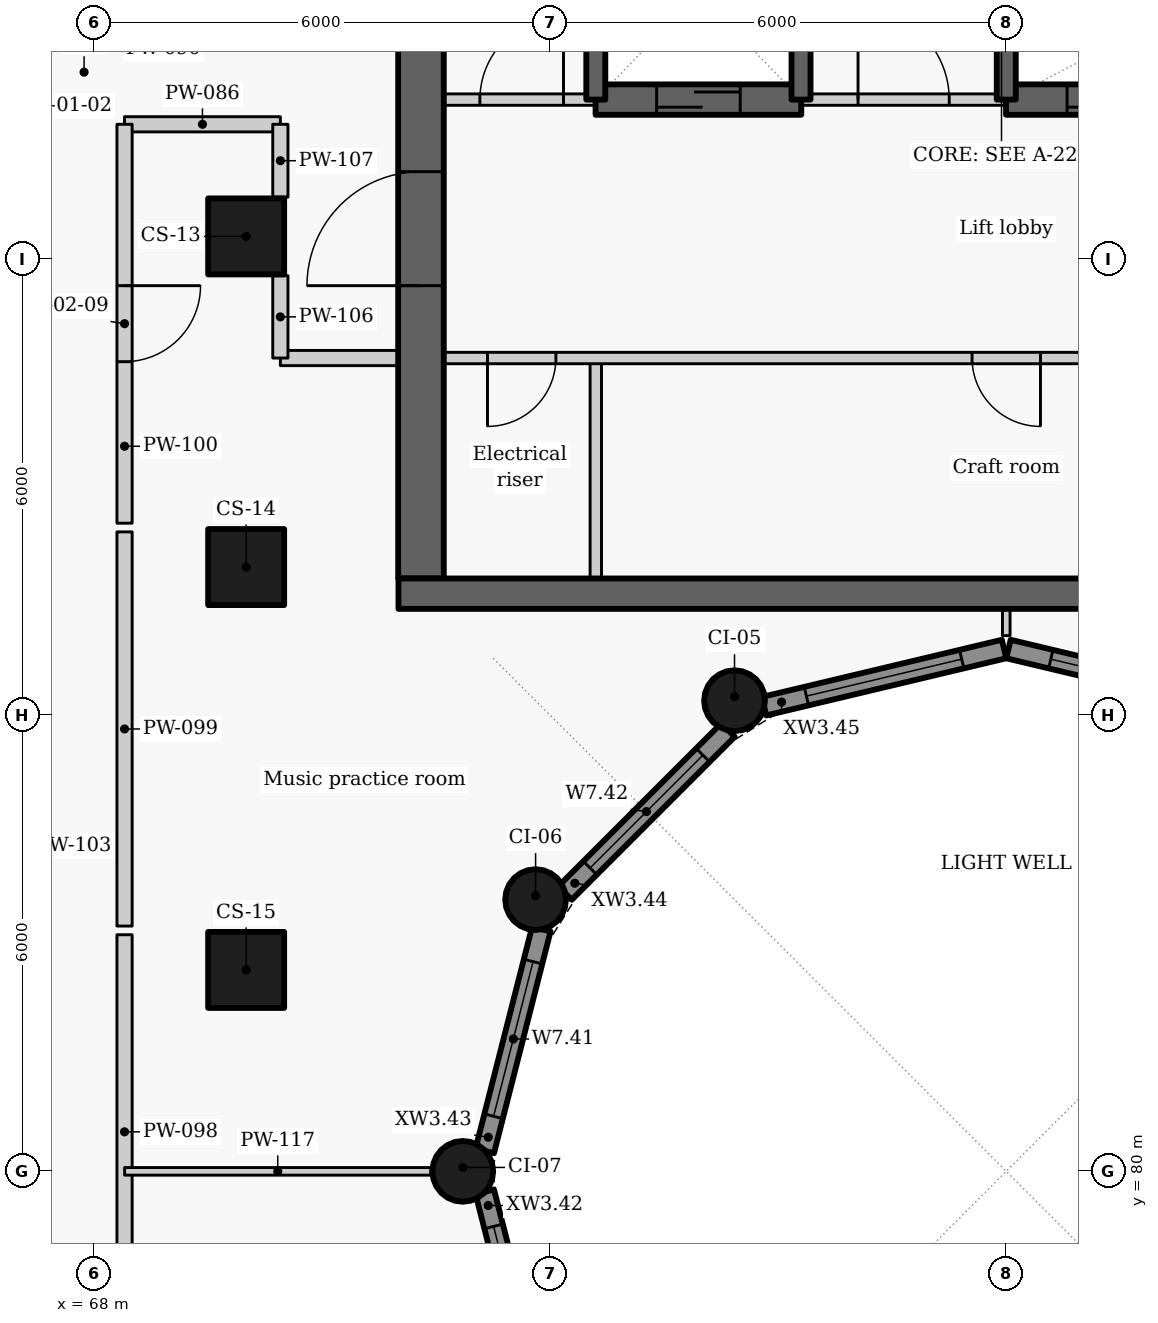
"""IFC4 building model, lengths in metres.
Left out: names, types, materials, properties, quantities, classifications, styles, units other than length and angle.
Written with IfcOpenShell. Run it as: python <this file> out.ifc"""

import sys

from ifc_helpers import new_model, si_unit, direction, frame, frame_2d, origin, origin_2d, place, context, subcontext, project, spatial, rectangle, circle, extrude, element, fill, save


model = new_model("IFC4")
c1 = context("Model", 3, precision=1e-05, world=origin(), true_north=direction((0.0, 1.0)))
c2 = subcontext(c1, "Body", "Model", "MODEL_VIEW")
j1 = project(units=[si_unit("LENGTHUNIT", "METRE"), si_unit("PLANEANGLEUNIT", "RADIAN")], contexts=[c1])
p1 = place(None, origin())
s1 = spatial("IfcSite", under=j1, at=p1, CompositionType="ELEMENT")
p2 = place(p1, origin())
s2 = spatial("IfcBuilding", under=s1, at=p2, CompositionType="ELEMENT")
p3 = place(p2, frame((0.0, 0.0, 130.5)))
s3 = spatial("IfcBuildingStorey", under=s2, at=p3, CompositionType="ELEMENT", Elevation=130.5)
for number, where, z_axis, x_axis in (
    (1, (70.0, 92.3, 0.0), (0.0, 0.0, 1.0), (0.0, -1.0, 0.0)),
    (2, (70.0, 87.95, 0.0), (0.0, 0.0, 1.0), (0.0, -1.0, 0.0)),
    (3, (70.0, 82.65, 0.0), (0.0, 0.0, 1.0), (0.0, -1.0, 0.0)),
):
    element("IfcColumn", number, at=place(p3, frame(where, z_axis=z_axis, x_axis=x_axis)), inside=s3, PredefinedType="COLUMN", context=c2, shape_type="SweptSolid", body=[
        extrude(rectangle(XDim=1.0, YDim=1.0, at=origin_2d()), origin(), (0.0, 0.0, 1.0), 3.3),
    ])
for number, where, z_axis, x_axis in (
    (4, (76.425, 86.192, 0.0), (0.0, 0.0, 1.0), (-0.866, -0.5, 0.0)),
    (5, (73.808, 83.575, 0.0), (0.0, 0.0, 1.0), (-0.5, -0.866, 0.0)),
    (6, (72.85, 80.0, 0.0), (0.0, 0.0, 1.0), (0.0, -1.0, 0.0)),
):
    element("IfcColumn", number, at=place(p3, frame(where, z_axis=z_axis, x_axis=x_axis)), inside=s3, PredefinedType="COLUMN", context=c2, shape_type="SweptSolid", body=[
        extrude(circle(Radius=0.4, at=origin_2d()), origin(), (0.0, 0.0, 1.0), 3.3),
    ])
p4 = place(p3, frame((73.883, 76.813, 0.0), z_axis=(0.0, 0.0, 1.0), x_axis=(-0.247055971283, 0.969001211069, 0.0)))
e7 = element("IfcWall", 7, at=p4, inside=s3, PredefinedType="SOLIDWALL", context=c2, shape_type="SweptSolid", body=[
    extrude(rectangle(XDim=3.01, YDim=0.25, at=frame_2d((1.505, 0.0))), origin(), (0.0, 0.0, 1.0), 2.425),
])
p5 = place(p4, frame((0.441, 0.0, 0.9)))
e8 = element("IfcOpeningElement", 8, at=p5, cuts=e7, PredefinedType="OPENING", context=c2, shape_type="SweptSolid", body=[
    extrude(rectangle(XDim=2.1, YDim=1.1, at=frame_2d((1.05, 0.55))), frame((0.0, 0.135, 0.0), z_axis=(0.0, -1.0, 0.0), x_axis=(1.0, 0.0, 0.0)), (0.0, 0.0, 1.0), 0.27),
])
p6 = place(p3, frame((73.14, 80.27, 0.0), z_axis=(0.0, 0.0, 1.0), x_axis=(0.247055971283, 0.969001211069, 0.0)))
e9 = element("IfcWall", 9, at=p6, inside=s3, PredefinedType="SOLIDWALL", context=c2, shape_type="SweptSolid", body=[
    extrude(rectangle(XDim=3.01, YDim=0.25, at=frame_2d((1.505, 0.0))), origin(), (0.0, 0.0, 1.0), 2.425),
])
p7 = place(p6, frame((0.469, 0.0, 0.9)))
e10 = element("IfcOpeningElement", 10, at=p7, cuts=e9, PredefinedType="OPENING", context=c2, shape_type="SweptSolid", body=[
    extrude(rectangle(XDim=2.1, YDim=1.1, at=frame_2d((1.05, 0.55))), frame((0.0, 0.135, 0.0), z_axis=(0.0, -1.0, 0.0), x_axis=(1.0, 0.0, 0.0)), (0.0, 0.0, 1.0), 0.27),
])
p8 = place(p3, frame((74.194, 83.661, 0.0), z_axis=(0.0, 0.0, 1.0), x_axis=(0.707106781187, 0.707106781187, 0.0)))
e11 = element("IfcWall", 11, at=p8, inside=s3, PredefinedType="SOLIDWALL", context=c2, shape_type="SweptSolid", body=[
    extrude(rectangle(XDim=3.033, YDim=0.25, at=frame_2d((1.517, 0.0))), origin(), (0.0, 0.0, 1.0), 2.425),
])
p9 = place(p8, frame((0.467, 0.0, 0.9)))
e12 = element("IfcOpeningElement", 12, at=p9, cuts=e11, PredefinedType="OPENING", context=c2, shape_type="SweptSolid", body=[
    extrude(rectangle(XDim=2.1, YDim=1.1, at=frame_2d((1.05, 0.55))), frame((0.0, 0.135, 0.0), z_axis=(0.0, -1.0, 0.0), x_axis=(1.0, 0.0, 0.0)), (0.0, 0.0, 1.0), 0.27),
])
p10 = place(p3, frame((76.814, 86.119, 0.0), z_axis=(0.0, 0.0, 1.0), x_axis=(0.972773113459, 0.231759508395, 0.0)))
e13 = element("IfcWall", 13, at=p10, inside=s3, PredefinedType="SOLIDWALL", context=c2, shape_type="SweptSolid", body=[
    extrude(rectangle(XDim=3.246, YDim=0.25, at=frame_2d((1.623, 0.0))), origin(), (0.0, 0.0, 1.0), 2.425),
])
p11 = place(p10, frame((0.573, 0.0, 0.9)))
e14 = element("IfcOpeningElement", 14, at=p11, cuts=e13, PredefinedType="OPENING", context=c2, shape_type="SweptSolid", body=[
    extrude(rectangle(XDim=2.1, YDim=1.1, at=frame_2d((1.05, 0.55))), frame((0.0, 0.135, 0.0), z_axis=(0.0, -1.0, 0.0), x_axis=(1.0, 0.0, 0.0)), (0.0, 0.0, 1.0), 0.27),
])
p12 = place(p3, frame((80.029, 86.872, 0.0), z_axis=(0.0, 0.0, 1.0), x_axis=(0.972773113459, -0.231759508395, 0.0)))
e15 = element("IfcWall", 15, at=p12, inside=s3, PredefinedType="SOLIDWALL", context=c2, shape_type="SweptSolid", body=[
    extrude(rectangle(XDim=3.246, YDim=0.25, at=frame_2d((1.623, 0.0))), origin(), (0.0, 0.0, 1.0), 2.425),
])
p13 = place(p12, frame((0.573, 0.0, 0.9)))
e16 = element("IfcOpeningElement", 16, at=p13, cuts=e15, PredefinedType="OPENING", context=c2, shape_type="SweptSolid", body=[
    extrude(rectangle(XDim=2.1, YDim=1.1, at=frame_2d((1.05, 0.55))), frame((0.0, 0.135, 0.0), z_axis=(0.0, -1.0, 0.0), x_axis=(1.0, 0.0, 0.0)), (0.0, 0.0, 1.0), 0.27),
])
p14 = place(p3, frame((74.6, 87.8, 0.0), z_axis=(0.0, 0.0, 1.0), x_axis=(0.0, 1.0, 0.0)))
e17 = element("IfcWall", 17, at=p14, inside=s3, PredefinedType="PARTITIONING", context=c2, shape_type="SweptSolid", body=[
    extrude(rectangle(XDim=2.9, YDim=0.15, at=frame_2d((1.45, 0.0))), origin(), (0.0, 0.0, 1.0), 3.025),
])
p15 = place(p3, frame((85.4, 90.7, 0.0), z_axis=(0.0, 0.0, 1.0), x_axis=(-1.0, 0.0, 0.0)))
e18 = element("IfcWall", 18, at=p15, inside=s3, PredefinedType="PARTITIONING", context=c2, shape_type="SweptSolid", body=[
    extrude(rectangle(XDim=13.4, YDim=0.15, at=frame_2d((6.7, 0.0))), origin(), (0.0, 0.0, 1.0), 3.025),
])
p16 = place(p15, frame((11.325, 0.0, 0.0)))
e19 = element("IfcOpeningElement", 19, at=p16, cuts=e18, PredefinedType="OPENING", context=c2, shape_type="SweptSolid", body=[
    extrude(rectangle(XDim=0.9, YDim=2.1, at=frame_2d((0.45, 1.05))), frame((0.0, 0.085, 0.0), z_axis=(0.0, -1.0, 0.0), x_axis=(1.0, 0.0, 0.0)), (0.0, 0.0, 1.0), 0.17),
])
p17 = place(p15, frame((4.95, 0.0, 0.0)))
e20 = element("IfcOpeningElement", 20, at=p17, cuts=e18, PredefinedType="OPENING", context=c2, shape_type="SweptSolid", body=[
    extrude(rectangle(XDim=0.9, YDim=2.1, at=frame_2d((0.45, 1.05))), frame((0.0, 0.085, 0.0), z_axis=(0.0, -1.0, 0.0), x_axis=(1.0, 0.0, 0.0)), (0.0, 0.0, 1.0), 0.17),
])
p18 = place(p3, frame((72.3, 87.8, -0.275), z_axis=(0.0, 0.0, 1.0), x_axis=(0.0, 1.0, 0.0)))
e21 = element("IfcWall", 21, at=p18, inside=s3, PredefinedType="SHEAR", context=c2, shape_type="SweptSolid", body=[
    extrude(rectangle(XDim=9.1, YDim=0.6, at=frame_2d((4.55, 0.0))), origin(), (0.0, 0.0, 1.0), 3.3),
])
p19 = place(p18, frame((3.852, 0.0, 0.275)))
e22 = element("IfcOpeningElement", 22, at=p19, cuts=e21, PredefinedType="OPENING", context=c2, shape_type="SweptSolid", body=[
    extrude(rectangle(XDim=1.5, YDim=2.1, at=frame_2d((0.75, 1.05))), frame((0.0, 0.31, 0.0), z_axis=(0.0, -1.0, 0.0), x_axis=(1.0, 0.0, 0.0)), (0.0, 0.0, 1.0), 0.62),
])
p20 = place(p3, frame((72.0, 94.1, 0.0), z_axis=(0.0, 0.0, 1.0), x_axis=(1.0, 0.0, 0.0)))
e23 = element("IfcWall", 23, at=p20, inside=s3, PredefinedType="PARTITIONING", context=c2, shape_type="SweptSolid", body=[
    extrude(rectangle(XDim=2.603, YDim=0.15, at=frame_2d((1.302, 0.0))), origin(), (0.0, 0.0, 1.0), 3.025),
])
p21 = place(p20, frame((1.075, 0.0, 0.0)))
e24 = element("IfcOpeningElement", 24, at=p21, cuts=e23, PredefinedType="OPENING", context=c2, shape_type="SweptSolid", body=[
    extrude(rectangle(XDim=1.1, YDim=2.1, at=frame_2d((0.55, 1.05))), frame((0.0, 0.085, 0.0), z_axis=(0.0, -1.0, 0.0), x_axis=(1.0, 0.0, 0.0)), (0.0, 0.0, 1.0), 0.17),
])
p22 = place(p3, frame((77.297, 94.1, 0.0), z_axis=(0.0, 0.0, 1.0), x_axis=(1.0, 0.0, 0.0)))
e25 = element("IfcWall", 25, at=p22, inside=s3, PredefinedType="PARTITIONING", context=c2, shape_type="SweptSolid", body=[
    extrude(rectangle(XDim=2.706, YDim=0.15, at=frame_2d((1.353, 0.0))), origin(), (0.0, 0.0, 1.0), 3.025),
])
p23 = place(p22, frame((0.753, 0.0, 0.0)))
e26 = element("IfcOpeningElement", 26, at=p23, cuts=e25, PredefinedType="OPENING", context=c2, shape_type="SweptSolid", body=[
    extrude(rectangle(XDim=1.2, YDim=2.1, at=frame_2d((0.6, 1.05))), frame((0.0, 0.085, 0.0), z_axis=(0.0, -1.0, 0.0), x_axis=(1.0, 0.0, 0.0)), (0.0, 0.0, 1.0), 0.17),
])
p24 = place(p3, frame((74.597, 94.1, -0.275), z_axis=(0.0, 0.0, 1.0), x_axis=(1.0, 0.0, 0.0)))
e27 = element("IfcWall", 27, at=p24, inside=s3, PredefinedType="SHEAR", context=c2, shape_type="SweptSolid", body=[
    extrude(rectangle(XDim=2.706, YDim=0.4, at=frame_2d((1.353, 0.0))), origin(), (0.0, 0.0, 1.0), 3.3),
])
p25 = place(p24, frame((0.803, 0.0, 0.275)))
e28 = element("IfcOpeningElement", 28, at=p25, cuts=e27, PredefinedType="OPENING", context=c2, shape_type="SweptSolid", body=[
    extrude(rectangle(XDim=1.1, YDim=2.1, at=frame_2d((0.55, 1.05))), frame((0.0, 0.21, 0.0), z_axis=(0.0, -1.0, 0.0), x_axis=(1.0, 0.0, 0.0)), (0.0, 0.0, 1.0), 0.42),
])
p26 = place(p3, frame((79.997, 94.1, -0.275), z_axis=(0.0, 0.0, 1.0), x_axis=(1.0, 0.0, 0.0)))
e29 = element("IfcWall", 29, at=p26, inside=s3, PredefinedType="SHEAR", context=c2, shape_type="SweptSolid", body=[
    extrude(rectangle(XDim=5.406, YDim=0.4, at=frame_2d((2.703, 0.0))), origin(), (0.0, 0.0, 1.0), 3.3),
])
p27 = place(p26, frame((0.803, 0.0, 0.275)))
e30 = element("IfcOpeningElement", 30, at=p27, cuts=e29, PredefinedType="OPENING", context=c2, shape_type="SweptSolid", body=[
    extrude(rectangle(XDim=1.1, YDim=2.1, at=frame_2d((0.55, 1.05))), frame((0.0, 0.21, 0.0), z_axis=(0.0, -1.0, 0.0), x_axis=(1.0, 0.0, 0.0)), (0.0, 0.0, 1.0), 0.42),
])
for number, where, z_axis, x_axis in (
    (31, (74.6, 94.1, -0.275), (0.0, 0.0, 1.0), (0.0, 1.0, 0.0)),
    (32, (77.3, 94.1, -0.275), (0.0, 0.0, 1.0), (0.0, 1.0, 0.0)),
    (33, (80.0, 94.1, -0.275), (0.0, 0.0, 1.0), (0.0, 1.0, 0.0)),
):
    element("IfcWall", number, at=place(p3, frame(where, z_axis=z_axis, x_axis=x_axis)), inside=s3, PredefinedType="SHEAR", context=c2, shape_type="SweptSolid", body=[
        extrude(rectangle(XDim=2.8, YDim=0.25, at=frame_2d((1.4, 0.0))), origin(), (0.0, 0.0, 1.0), 3.3),
    ])
p28 = place(p3, frame((68.4, 93.775, 0.0), z_axis=(0.0, 0.0, 1.0), x_axis=(1.0, 0.0, 0.0)))
e34 = element("IfcWall", 34, at=p28, inside=s3, PredefinedType="PARTITIONING", context=c2, shape_type="SweptSolid", body=[
    extrude(rectangle(XDim=2.05, YDim=0.2, at=frame_2d((1.025, 0.0))), origin(), (0.0, 0.0, 1.0), 2.505),
])
p29 = place(p3, frame((70.45, 90.7, 0.0), z_axis=(0.0, 0.0, 1.0), x_axis=(1.0, 0.0, 0.0)))
e35 = element("IfcWall", 35, at=p29, inside=s3, PredefinedType="PARTITIONING", context=c2, shape_type="SweptSolid", body=[
    extrude(rectangle(XDim=1.55, YDim=0.2, at=frame_2d((0.775, 0.0))), origin(), (0.0, 0.0, 1.0), 3.025),
])
for number, where, z_axis, x_axis in (
    (36, (68.4, 77.927, 0.0), (0.0, 0.0, 1.0), (0.0, 1.0, 0.0)),
    (37, (68.4, 83.227, 0.0), (0.0, 0.0, 1.0), (0.0, 1.0, 0.0)),
):
    element("IfcWall", number, at=place(p3, frame(where, z_axis=z_axis, x_axis=x_axis)), inside=s3, PredefinedType="PARTITIONING", context=c2, shape_type="SweptSolid", body=[
        extrude(rectangle(XDim=5.186, YDim=0.2, at=frame_2d((2.593, 0.0))), origin(), (0.0, 0.0, 1.0), 3.025),
    ])
p30 = place(p3, frame((68.4, 93.775, 0.0), z_axis=(0.0, 0.0, 1.0), x_axis=(0.0, -1.0, 0.0)))
e38 = element("IfcWall", 38, at=p30, inside=s3, PredefinedType="PARTITIONING", context=c2, shape_type="SweptSolid", body=[
    extrude(rectangle(XDim=5.248, YDim=0.2, at=frame_2d((2.624, 0.0))), origin(), (0.0, 0.0, 1.0), 3.025),
])
p31 = place(p30, frame((2.123, 0.0, 0.0)))
e39 = element("IfcOpeningElement", 39, at=p31, cuts=e38, PredefinedType="OPENING", context=c2, shape_type="SweptSolid", body=[
    extrude(rectangle(XDim=1.0, YDim=2.1, at=frame_2d((0.5, 1.05))), frame((0.0, 0.11, 0.0), z_axis=(0.0, -1.0, 0.0), x_axis=(1.0, 0.0, 0.0)), (0.0, 0.0, 1.0), 0.22),
])
p32 = place(p3, frame((70.45, 90.7, 0.0), z_axis=(0.0, 0.0, 1.0), x_axis=(0.0, 1.0, 0.0)))
e40 = element("IfcWall", 40, at=p32, inside=s3, PredefinedType="PARTITIONING", context=c2, shape_type="SweptSolid", body=[
    extrude(rectangle(XDim=1.083, YDim=0.2, at=frame_2d((0.542, 0.0))), origin(), (0.0, 0.0, 1.0), 3.025),
])
p33 = place(p3, frame((70.45, 92.817, 0.0), z_axis=(0.0, 0.0, 1.0), x_axis=(0.0, 1.0, 0.0)))
e41 = element("IfcWall", 41, at=p33, inside=s3, PredefinedType="PARTITIONING", context=c2, shape_type="SweptSolid", body=[
    extrude(rectangle(XDim=0.958, YDim=0.2, at=frame_2d((0.479, 0.0))), origin(), (0.0, 0.0, 1.0), 3.025),
])
p34 = place(p3, frame((80.0, 87.048, 0.0), z_axis=(0.0, 0.0, 1.0), x_axis=(0.0, 1.0, 0.0)))
e42 = element("IfcWall", 42, at=p34, inside=s3, PredefinedType="PARTITIONING", context=c2, shape_type="SweptSolid", body=[
    extrude(rectangle(XDim=0.352, YDim=0.1, at=frame_2d((0.176, 0.0))), origin(), (0.0, 0.0, 1.0), 3.025),
])
p35 = place(p3, frame((68.401, 80.0, 0.0), z_axis=(0.0, 0.0, 1.0), x_axis=(1.0, 0.0, 0.0)))
e43 = element("IfcWall", 43, at=p35, inside=s3, PredefinedType="PARTITIONING", context=c2, shape_type="SweptSolid", body=[
    extrude(rectangle(XDim=4.029, YDim=0.1, at=frame_2d((2.015, 0.0))), origin(), (0.0, 0.0, 1.0), 2.505),
])
p36 = place(p3, frame((72.004, 87.6, -0.275), z_axis=(0.0, 0.0, 1.0), x_axis=(1.0, 0.0, 0.0)))
e44 = element("IfcWall", 44, at=p36, inside=s3, PredefinedType="SHEAR", context=c2, shape_type="SweptSolid", body=[
    extrude(rectangle(XDim=15.992, YDim=0.4, at=frame_2d((7.996, 0.0))), origin(), (0.0, 0.0, 1.0), 3.3),
])
p37 = place(p5, origin())
e45 = element("IfcWindow", 45, at=p37, inside=s3, PartitioningType="SINGLE_PANEL", PredefinedType="WINDOW", context=c2, shape_type="SweptSolid", body=[
    extrude(rectangle(XDim=2.1, YDim=1.1, at=frame_2d((1.05, 0.55))), frame((0.0, 0.03, 0.0), z_axis=(0.0, -1.0, 0.0), x_axis=(1.0, 0.0, 0.0)), (0.0, 0.0, 1.0), 0.06),
])
fill(e8, e45)
p38 = place(p7, origin())
e46 = element("IfcWindow", 46, at=p38, inside=s3, PartitioningType="SINGLE_PANEL", PredefinedType="WINDOW", context=c2, shape_type="SweptSolid", body=[
    extrude(rectangle(XDim=2.1, YDim=1.1, at=frame_2d((1.05, 0.55))), frame((0.0, 0.03, 0.0), z_axis=(0.0, -1.0, 0.0), x_axis=(1.0, 0.0, 0.0)), (0.0, 0.0, 1.0), 0.06),
])
fill(e10, e46)
p39 = place(p9, origin())
e47 = element("IfcWindow", 47, at=p39, inside=s3, PartitioningType="SINGLE_PANEL", PredefinedType="WINDOW", context=c2, shape_type="SweptSolid", body=[
    extrude(rectangle(XDim=2.1, YDim=1.1, at=frame_2d((1.05, 0.55))), frame((0.0, 0.03, 0.0), z_axis=(0.0, -1.0, 0.0), x_axis=(1.0, 0.0, 0.0)), (0.0, 0.0, 1.0), 0.06),
])
fill(e12, e47)
p40 = place(p11, origin())
e48 = element("IfcWindow", 48, at=p40, inside=s3, PartitioningType="SINGLE_PANEL", PredefinedType="WINDOW", context=c2, shape_type="SweptSolid", body=[
    extrude(rectangle(XDim=2.1, YDim=1.1, at=frame_2d((1.05, 0.55))), frame((0.0, 0.03, 0.0), z_axis=(0.0, -1.0, 0.0), x_axis=(1.0, 0.0, 0.0)), (0.0, 0.0, 1.0), 0.06),
])
fill(e14, e48)
p41 = place(p13, origin())
e49 = element("IfcWindow", 49, at=p41, inside=s3, PartitioningType="SINGLE_PANEL", PredefinedType="WINDOW", context=c2, shape_type="SweptSolid", body=[
    extrude(rectangle(XDim=2.1, YDim=1.1, at=frame_2d((1.05, 0.55))), frame((0.0, 0.03, 0.0), z_axis=(0.0, -1.0, 0.0), x_axis=(1.0, 0.0, 0.0)), (0.0, 0.0, 1.0), 0.06),
])
fill(e16, e49)
p42 = place(p16, origin())
e50 = element("IfcDoor", 50, at=p42, inside=s3, OperationType="SINGLE_SWING_RIGHT", PredefinedType="DOOR", context=c2, shape_type="SweptSolid", body=[
    extrude(rectangle(XDim=0.9, YDim=2.1, at=frame_2d((0.45, 1.05))), frame((0.0, 0.025, 0.0), z_axis=(0.0, -1.0, 0.0), x_axis=(1.0, 0.0, 0.0)), (0.0, 0.0, 1.0), 0.05),
])
fill(e19, e50)
p43 = place(p17, origin())
e51 = element("IfcDoor", 51, at=p43, inside=s3, OperationType="SINGLE_SWING_LEFT", PredefinedType="DOOR", context=c2, shape_type="SweptSolid", body=[
    extrude(rectangle(XDim=0.9, YDim=2.1, at=frame_2d((0.45, 1.05))), frame((0.0, 0.025, 0.0), z_axis=(0.0, -1.0, 0.0), x_axis=(1.0, 0.0, 0.0)), (0.0, 0.0, 1.0), 0.05),
])
fill(e20, e51)
p44 = place(p21, origin())
e52 = element("IfcDoor", 52, at=p44, inside=s3, OperationType="SINGLE_SWING_RIGHT", PredefinedType="DOOR", context=c2, shape_type="SweptSolid", body=[
    extrude(rectangle(XDim=1.1, YDim=2.1, at=frame_2d((0.55, 1.05))), frame((0.0, 0.025, 0.0), z_axis=(0.0, -1.0, 0.0), x_axis=(1.0, 0.0, 0.0)), (0.0, 0.0, 1.0), 0.05),
])
fill(e24, e52)
p45 = place(p25, origin())
e53 = element("IfcDoor", 53, at=p45, inside=s3, OperationType="SLIDING_TO_LEFT", PredefinedType="DOOR", context=c2, shape_type="SweptSolid", body=[
    extrude(rectangle(XDim=1.1, YDim=2.1, at=frame_2d((0.55, 1.05))), frame((0.0, 0.025, 0.0), z_axis=(0.0, -1.0, 0.0), x_axis=(1.0, 0.0, 0.0)), (0.0, 0.0, 1.0), 0.05),
])
fill(e28, e53)
p46 = place(p23, origin())
e54 = element("IfcDoor", 54, at=p46, inside=s3, OperationType="DOUBLE_DOOR_SINGLE_SWING", PredefinedType="DOOR", context=c2, shape_type="SweptSolid", body=[
    extrude(rectangle(XDim=1.2, YDim=2.1, at=frame_2d((0.6, 1.05))), frame((0.0, 0.025, 0.0), z_axis=(0.0, -1.0, 0.0), x_axis=(1.0, 0.0, 0.0)), (0.0, 0.0, 1.0), 0.05),
])
fill(e26, e54)
p47 = place(p27, origin())
e55 = element("IfcDoor", 55, at=p47, inside=s3, OperationType="SLIDING_TO_LEFT", PredefinedType="DOOR", context=c2, shape_type="SweptSolid", body=[
    extrude(rectangle(XDim=1.1, YDim=2.1, at=frame_2d((0.55, 1.05))), frame((0.0, 0.025, 0.0), z_axis=(0.0, -1.0, 0.0), x_axis=(1.0, 0.0, 0.0)), (0.0, 0.0, 1.0), 0.05),
])
fill(e30, e55)
p48 = place(p31, origin())
e56 = element("IfcDoor", 56, at=p48, inside=s3, OperationType="SINGLE_SWING_LEFT", PredefinedType="DOOR", context=c2, shape_type="SweptSolid", body=[
    extrude(rectangle(XDim=1.0, YDim=2.1, at=frame_2d((0.5, 1.05))), frame((0.0, 0.025, 0.0), z_axis=(0.0, -1.0, 0.0), x_axis=(1.0, 0.0, 0.0)), (0.0, 0.0, 1.0), 0.05),
])
fill(e39, e56)
p49 = place(p19, origin())
e57 = element("IfcDoor", 57, at=p49, inside=s3, OperationType="DOUBLE_DOOR_SINGLE_SWING", PredefinedType="DOOR", context=c2, shape_type="SweptSolid", body=[
    extrude(rectangle(XDim=1.5, YDim=2.1, at=frame_2d((0.75, 1.05))), frame((0.0, 0.025, 0.0), z_axis=(0.0, -1.0, 0.0), x_axis=(1.0, 0.0, 0.0)), (0.0, 0.0, 1.0), 0.05),
])
fill(e22, e57)
save(model, sys.argv[1])
